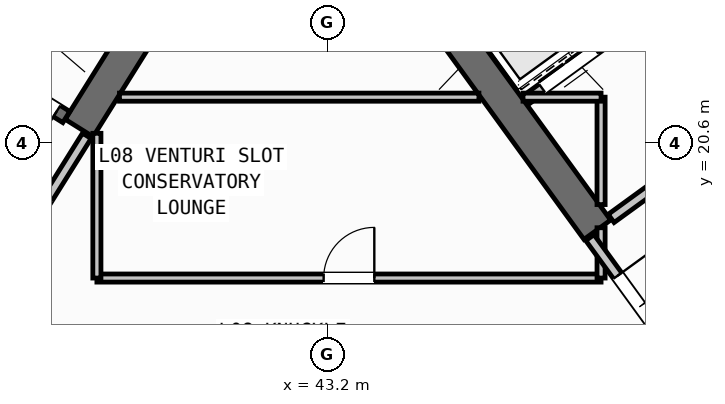
"""IFC4 building model, lengths in metres.
Left out: names, types, materials, properties, quantities, classifications, styles, units other than length and angle.
Written with IfcOpenShell. Run it as: python <this file> out.ifc"""

import sys

from ifc_helpers import new_model, si_unit, direction, frame, frame_2d, origin, place, context, subcontext, project, spatial, rectangle, extrude, source, transform, mapped, element, fill, save


model = new_model("IFC4")
c1 = context("Model", 3, precision=1e-05, world=origin(), true_north=direction((0.0, 1.0)))
c2 = subcontext(c1, "Body", "Model", "MODEL_VIEW")
j1 = project(units=[si_unit("LENGTHUNIT", "METRE"), si_unit("PLANEANGLEUNIT", "RADIAN")], contexts=[c1])
p1 = place(None, origin())
s1 = spatial("IfcSite", under=j1, at=p1, CompositionType="ELEMENT")
p2 = place(p1, origin())
s2 = spatial("IfcBuilding", under=s1, at=p2, CompositionType="ELEMENT")
p3 = place(p2, frame((0.0, 0.0, 34.8)))
s3 = spatial("IfcBuildingStorey", under=s2, at=p3, CompositionType="ELEMENT", Elevation=34.8)
p4 = place(p3, frame((40.168, 23.88, 0.0), z_axis=(0.0, 0.0, 1.0), x_axis=(-0.529893103397, -0.8480644427, 0.0)))
e1 = element("IfcWall", 1, at=p4, inside=s3, PredefinedType="SHEAR", context=c2, shape_type="SweptSolid", body=[
    extrude(rectangle(XDim=3.525, YDim=0.65, at=frame_2d((1.763, 0.0))), origin(), (0.0, 0.0, 1.0), 3.35),
])
p5 = place(p3, frame((48.526, 18.884, 0.0), z_axis=(0.0, 0.0, 1.0), x_axis=(-0.58777996584, 0.809020835181, 0.0)))
e2 = element("IfcWall", 2, at=p5, inside=s3, PredefinedType="SHEAR", context=c2, shape_type="SweptSolid", body=[
    extrude(rectangle(XDim=6.375, YDim=0.65, at=frame_2d((3.188, 0.0))), origin(), (0.0, 0.0, 1.0), 3.35),
])
p6 = place(p3, frame((38.046, 21.108, 0.0), z_axis=(0.0, 0.0, 1.0), x_axis=(-0.848054434086, 0.529909121291, 0.0)))
e3 = element("IfcWall", 3, at=p6, inside=s3, PredefinedType="SHEAR", context=c2, shape_type="SweptSolid", body=[
    extrude(rectangle(XDim=7.33, YDim=0.26, at=frame_2d((3.665, 0.0))), origin(), (0.0, 0.0, 1.0), 3.35),
])
p7 = place(p6, frame((0.22, 0.0, 0.0)))
e4 = element("IfcOpeningElement", 4, at=p7, cuts=e3, PredefinedType="OPENING", context=c2, shape_type="SweptSolid", body=[
    extrude(rectangle(XDim=1.1, YDim=2.1, at=frame_2d((0.55, 1.05))), frame((0.0, 0.14, 0.0), z_axis=(0.0, -1.0, 0.0), x_axis=(1.0, 0.0, 0.0)), (0.0, 0.0, 1.0), 0.28),
])
p8 = place(p3, frame((47.106, 21.437, 0.0), z_axis=(0.0, 0.0, 1.0), x_axis=(0.809012514015, 0.58779141893, 0.0)))
e5 = element("IfcWall", 5, at=p8, inside=s3, PredefinedType="STANDARD", context=c2, shape_type="SweptSolid", body=[
    extrude(rectangle(XDim=3.398, YDim=0.2, at=frame_2d((1.699, 0.0))), origin(), (0.0, 0.0, 1.0), 3.34),
])
p9 = place(p8, frame((0.408, 0.0, 0.0)))
e6 = element("IfcOpeningElement", 6, at=p9, cuts=e5, PredefinedType="OPENING", context=c2, shape_type="SweptSolid", body=[
    extrude(rectangle(XDim=1.3, YDim=2.2, at=frame_2d((0.65, 1.1))), frame((0.0, 0.11, 0.0), z_axis=(0.0, -1.0, 0.0), x_axis=(1.0, 0.0, 0.0)), (0.0, 0.0, 1.0), 0.22),
])
p10 = place(p3, frame((48.799, 19.107, 0.0), z_axis=(0.0, 0.0, 1.0), x_axis=(0.809012959416, 0.587790805897, 0.0)))
e7 = element("IfcWall", 7, at=p10, inside=s3, PredefinedType="STANDARD", context=c2, shape_type="SweptSolid", body=[
    extrude(rectangle(XDim=5.718, YDim=0.2, at=frame_2d((2.859, 0.0))), origin(), (0.0, 0.0, 1.0), 3.34),
])
p11 = place(p10, frame((2.498, 0.0, 0.0)))
e8 = element("IfcOpeningElement", 8, at=p11, cuts=e7, PredefinedType="OPENING", context=c2, shape_type="SweptSolid", body=[
    extrude(rectangle(XDim=1.15, YDim=2.1, at=frame_2d((0.575, 1.05))), frame((0.0, 0.11, 0.0), z_axis=(0.0, -1.0, 0.0), x_axis=(1.0, 0.0, 0.0)), (0.0, 0.0, 1.0), 0.22),
])
p12 = place(p3, frame((38.451, 20.737, 0.0), z_axis=(0.0, 0.0, 1.0), x_axis=(-0.529924799939, -0.848044637038, 0.0)))
e9 = element("IfcWall", 9, at=p12, inside=s3, PredefinedType="STANDARD", context=c2, shape_type="SweptSolid", body=[
    extrude(rectangle(XDim=2.96, YDim=0.2, at=frame_2d((1.48, 0.0))), origin(), (0.0, 0.0, 1.0), 3.34),
])
p13 = place(p12, frame((1.46, 0.0, 0.0)))
e10 = element("IfcOpeningElement", 10, at=p13, cuts=e9, PredefinedType="OPENING", context=c2, shape_type="SweptSolid", body=[
    extrude(rectangle(XDim=0.86, YDim=2.05, at=frame_2d((0.43, 1.025))), frame((0.0, 0.11, 0.0), z_axis=(0.0, -1.0, 0.0), x_axis=(1.0, 0.0, 0.0)), (0.0, 0.0, 1.0), 0.22),
])
p14 = place(p3, frame((38.65, 17.93, 0.0), z_axis=(0.0, 0.0, 1.0), x_axis=(1.0, 0.0, 0.0)))
e11 = element("IfcWall", 11, at=p14, inside=s3, PredefinedType="PARTITIONING", context=c2, shape_type="SweptSolid", body=[
    extrude(rectangle(XDim=9.95, YDim=0.16, at=frame_2d((4.975, 0.0))), origin(), (0.0, 0.0, 1.0), 3.34),
])
p15 = place(p14, frame((4.475, 0.0, 0.0)))
e12 = element("IfcOpeningElement", 12, at=p15, cuts=e11, PredefinedType="OPENING", context=c2, shape_type="SweptSolid", body=[
    extrude(rectangle(XDim=1.0, YDim=2.1, at=frame_2d((0.5, 1.05))), frame((0.0, 0.09, 0.0), z_axis=(0.0, -1.0, 0.0), x_axis=(1.0, 0.0, 0.0)), (0.0, 0.0, 1.0), 0.18),
])
p16 = place(p3, frame((38.65, 17.93, 0.0), z_axis=(0.0, 0.0, 1.0), x_axis=(0.0, 1.0, 0.0)))
e13 = element("IfcWall", 13, at=p16, inside=s3, PredefinedType="PARTITIONING", context=c2, shape_type="SweptSolid", body=[
    extrude(rectangle(XDim=2.857, YDim=0.16, at=frame_2d((1.428, 0.0))), origin(), (0.0, 0.0, 1.0), 3.34),
])
p17 = place(p3, frame((48.6, 17.93, 0.0), z_axis=(0.0, 0.0, 1.0), x_axis=(0.0, 1.0, 0.0)))
e14 = element("IfcWall", 14, at=p17, inside=s3, PredefinedType="PARTITIONING", context=c2, shape_type="SweptSolid", body=[
    extrude(rectangle(XDim=0.993, YDim=0.16, at=frame_2d((0.496, 0.0))), origin(), (0.0, 0.0, 1.0), 3.34),
])
p18 = place(p3, frame((48.6, 19.38, 0.0), z_axis=(0.0, 0.0, 1.0), x_axis=(0.0, 1.0, 0.0)))
e15 = element("IfcWall", 15, at=p18, inside=s3, PredefinedType="PARTITIONING", context=c2, shape_type="SweptSolid", body=[
    extrude(rectangle(XDim=2.12, YDim=0.16, at=frame_2d((1.06, 0.0))), origin(), (0.0, 0.0, 1.0), 3.34),
])
p19 = place(p3, frame((39.095, 21.5, 0.0), z_axis=(0.0, 0.0, 1.0), x_axis=(1.0, 0.0, 0.0)))
e16 = element("IfcWall", 16, at=p19, inside=s3, PredefinedType="PARTITIONING", context=c2, shape_type="SweptSolid", body=[
    extrude(rectangle(XDim=7.094, YDim=0.16, at=frame_2d((3.547, 0.0))), origin(), (0.0, 0.0, 1.0), 3.34),
])
p20 = place(p3, frame((47.06, 21.5, 0.0), z_axis=(0.0, 0.0, 1.0), x_axis=(1.0, 0.0, 0.0)))
e17 = element("IfcWall", 17, at=p20, inside=s3, PredefinedType="PARTITIONING", context=c2, shape_type="SweptSolid", body=[
    extrude(rectangle(XDim=1.54, YDim=0.16, at=frame_2d((0.77, 0.0))), origin(), (0.0, 0.0, 1.0), 3.34),
])
p21 = place(p3, frame((50.119, 16.333, 0.0), z_axis=(0.0, 0.0, 1.0), x_axis=(-0.587749856981, 0.809042709391, 0.0)))
e18 = element("IfcWall", 18, at=p21, inside=s3, PredefinedType="STANDARD", context=c2, shape_type="SweptSolid", body=[
    extrude(rectangle(XDim=2.96, YDim=0.2, at=frame_2d((1.48, 0.0))), origin(), (0.0, 0.0, 1.0), 3.34),
])
p22 = place(p21, frame((0.53, 0.0, 0.0)))
e19 = element("IfcOpeningElement", 19, at=p22, cuts=e18, PredefinedType="OPENING", context=c2, shape_type="SweptSolid", body=[
    extrude(rectangle(XDim=1.5, YDim=2.15, at=frame_2d((0.75, 1.075))), frame((0.0, 0.11, 0.0), z_axis=(0.0, -1.0, 0.0), x_axis=(1.0, 0.0, 0.0)), (0.0, 0.0, 1.0), 0.22),
])
m1 = source(origin(), c2, "Body", "SweptSolid", [
    extrude(rectangle(XDim=1.1, YDim=2.1, at=frame_2d((0.55, 1.05))), frame((0.0, 0.025, 0.0), z_axis=(0.0, -1.0, 0.0), x_axis=(1.0, 0.0, 0.0)), (0.0, 0.0, 1.0), 0.05),
])
p23 = place(p7, origin())
e20 = element("IfcDoor", 20, at=p23, inside=s3, OperationType="SINGLE_SWING_LEFT", PredefinedType="DOOR", context=c2, shape_type="MappedRepresentation", body=[
    mapped(m1, transform((0.0, 0.0, 0.0), scale=1.0)),
])
fill(e4, e20)
m2 = source(origin(), c2, "Body", "SweptSolid", [
    extrude(rectangle(XDim=1.3, YDim=2.2, at=frame_2d((0.65, 1.1))), frame((0.0, 0.025, 0.0), z_axis=(0.0, -1.0, 0.0), x_axis=(1.0, 0.0, 0.0)), (0.0, 0.0, 1.0), 0.05),
])
p24 = place(p9, origin())
e21 = element("IfcDoor", 21, at=p24, inside=s3, OperationType="DOUBLE_DOOR_SLIDING", PredefinedType="DOOR", context=c2, shape_type="MappedRepresentation", body=[
    mapped(m2, transform((0.0, 0.0, 0.0), scale=1.0)),
])
fill(e6, e21)
m3 = source(origin(), c2, "Body", "SweptSolid", [
    extrude(rectangle(XDim=1.0, YDim=2.1, at=frame_2d((0.5, 1.05))), frame((0.0, 0.025, 0.0), z_axis=(0.0, -1.0, 0.0), x_axis=(1.0, 0.0, 0.0)), (0.0, 0.0, 1.0), 0.05),
])
p25 = place(p15, origin())
e22 = element("IfcDoor", 22, at=p25, inside=s3, OperationType="SINGLE_SWING_RIGHT", PredefinedType="DOOR", context=c2, shape_type="MappedRepresentation", body=[
    mapped(m3, transform((0.0, 0.0, 0.0), scale=1.0)),
])
fill(e12, e22)
m4 = source(origin(), c2, "Body", "SweptSolid", [
    extrude(rectangle(XDim=1.5, YDim=2.15, at=frame_2d((0.75, 1.075))), frame((0.0, 0.025, 0.0), z_axis=(0.0, -1.0, 0.0), x_axis=(1.0, 0.0, 0.0)), (0.0, 0.0, 1.0), 0.05),
])
p26 = place(p22, frame((1.5, 0.0, 0.0), z_axis=(0.0, 0.0, 1.0), x_axis=(-1.0, 0.0, 0.0)))
e23 = element("IfcDoor", 23, at=p26, inside=s3, OperationType="DOUBLE_DOOR_SINGLE_SWING", PredefinedType="DOOR", context=c2, shape_type="MappedRepresentation", body=[
    mapped(m4, transform((0.0, 0.0, 0.0), scale=1.0)),
])
fill(e19, e23)
save(model, sys.argv[1])
